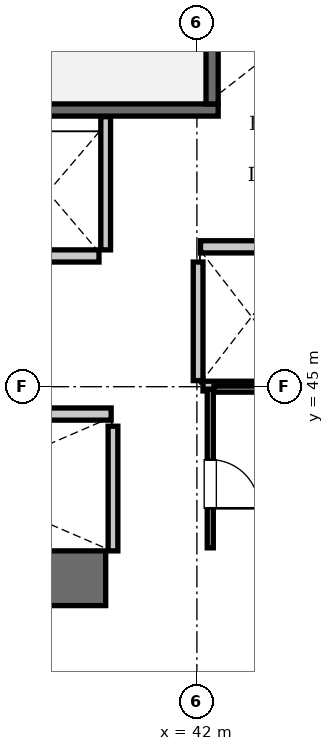
"""IFC4 building model, lengths in metres.
Left out: names, types, materials, properties, quantities, classifications, styles, units other than length and angle.
Written with IfcOpenShell. Run it as: python <this file> out.ifc"""

import sys

from ifc_helpers import new_model, si_unit, direction, frame, frame_2d, origin, place, context, subcontext, project, spatial, rectangle, extrude, element, fill, save


model = new_model("IFC4")
c1 = context("Model", 3, precision=1e-05, world=origin(), true_north=direction((0.0, 1.0)))
c2 = subcontext(c1, "Body", "Model", "MODEL_VIEW")
j1 = project(units=[si_unit("LENGTHUNIT", "METRE"), si_unit("PLANEANGLEUNIT", "RADIAN")], contexts=[c1])
p1 = place(None, origin())
s1 = spatial("IfcSite", under=j1, at=p1, CompositionType="ELEMENT")
p2 = place(p1, origin())
s2 = spatial("IfcBuilding", under=s1, at=p2, CompositionType="ELEMENT")
p3 = place(p2, frame((0.0, 0.0, 34.65)))
s3 = spatial("IfcBuildingStorey", under=s2, at=p3, CompositionType="ELEMENT", Elevation=34.65)
p4 = place(p3, frame((35.1, 41.85, 0.0), z_axis=(0.0, 0.0, 1.0), x_axis=(1.0, 0.0, 0.0)))
e1 = element("IfcWall", 1, at=p4, inside=s3, PredefinedType="SHEAR", context=c2, shape_type="SweptSolid", body=[
    extrude(rectangle(XDim=5.4, YDim=0.9, at=frame_2d((2.7, 0.0))), origin(), (0.0, 0.0, 1.0), 3.85),
])
p5 = place(p3, frame((33.25, 49.55, 0.0), z_axis=(0.0, 0.0, 1.0), x_axis=(1.0, 0.0, 0.0)))
e2 = element("IfcWall", 2, at=p5, inside=s3, PredefinedType="SOLIDWALL", context=c2, shape_type="SweptSolid", body=[
    extrude(rectangle(XDim=9.1, YDim=0.2, at=frame_2d((4.55, 0.0))), origin(), (0.0, 0.0, 1.0), 3.61),
])
p6 = place(p3, frame((42.25, 49.65, 0.0), z_axis=(0.0, 0.0, 1.0), x_axis=(0.0, 1.0, 0.0)))
e3 = element("IfcWall", 3, at=p6, inside=s3, PredefinedType="SOLIDWALL", context=c2, shape_type="SweptSolid", body=[
    extrude(rectangle(XDim=3.45, YDim=0.2, at=frame_2d((1.725, 0.0))), origin(), (0.0, 0.0, 1.0), 3.61),
])
p7 = place(p3, frame((42.06, 47.3, 0.0), z_axis=(0.0, 0.0, 1.0), x_axis=(1.0, 0.0, 0.0)))
e4 = element("IfcWall", 4, at=p7, inside=s3, PredefinedType="SOLIDWALL", context=c2, shape_type="SweptSolid", body=[
    extrude(rectangle(XDim=1.68, YDim=0.2, at=frame_2d((0.84, 0.0))), origin(), (0.0, 0.0, 1.0), 3.61),
])
p8 = place(p3, frame((38.91, 44.55, 0.0), z_axis=(0.0, 0.0, 1.0), x_axis=(1.0, 0.0, 0.0)))
e5 = element("IfcWall", 5, at=p8, inside=s3, PredefinedType="SOLIDWALL", context=c2, shape_type="SweptSolid", body=[
    extrude(rectangle(XDim=1.68, YDim=0.2, at=frame_2d((0.84, 0.0))), origin(), (0.0, 0.0, 1.0), 3.61),
])
p9 = place(p3, frame((38.71, 47.15, 0.0), z_axis=(0.0, 0.0, 1.0), x_axis=(1.0, 0.0, 0.0)))
e6 = element("IfcWall", 6, at=p9, inside=s3, PredefinedType="SOLIDWALL", context=c2, shape_type="SweptSolid", body=[
    extrude(rectangle(XDim=1.68, YDim=0.2, at=frame_2d((0.84, 0.0))), origin(), (0.0, 0.0, 1.0), 3.61),
])
p10 = place(p3, frame((42.02, 45.1, 0.0), z_axis=(0.0, 0.0, 1.0), x_axis=(0.0, 1.0, 0.0)))
e7 = element("IfcWall", 7, at=p10, inside=s3, PredefinedType="SOLIDWALL", context=c2, shape_type="SweptSolid", body=[
    extrude(rectangle(XDim=1.95, YDim=0.16, at=frame_2d((0.975, 0.0))), origin(), (0.0, 0.0, 1.0), 3.61),
])
p11 = place(p3, frame((42.1, 45.01, 0.0), z_axis=(0.0, 0.0, 1.0), x_axis=(1.0, 0.0, 0.0)))
e8 = element("IfcWall", 8, at=p11, inside=s3, PredefinedType="SOLIDWALL", context=c2, shape_type="SweptSolid", body=[
    extrude(rectangle(XDim=3.45, YDim=0.16, at=frame_2d((1.725, 0.0))), origin(), (0.0, 0.0, 1.0), 3.61),
])
p12 = place(p3, frame((40.62, 42.3, 0.0), z_axis=(0.0, 0.0, 1.0), x_axis=(0.0, 1.0, 0.0)))
e9 = element("IfcWall", 9, at=p12, inside=s3, PredefinedType="SOLIDWALL", context=c2, shape_type="SweptSolid", body=[
    extrude(rectangle(XDim=2.05, YDim=0.16, at=frame_2d((1.025, 0.0))), origin(), (0.0, 0.0, 1.0), 3.61),
])
p13 = place(p3, frame((40.5, 47.25, 0.0), z_axis=(0.0, 0.0, 1.0), x_axis=(0.0, 1.0, 0.0)))
e10 = element("IfcWall", 10, at=p13, inside=s3, PredefinedType="SOLIDWALL", context=c2, shape_type="SweptSolid", body=[
    extrude(rectangle(XDim=2.19, YDim=0.16, at=frame_2d((1.095, 0.0))), origin(), (0.0, 0.0, 1.0), 3.61),
])
p14 = place(p3, frame((42.22, 42.35, 0.0), z_axis=(0.0, 0.0, 1.0), x_axis=(0.0, 1.0, 0.0)))
e11 = element("IfcWall", 11, at=p14, inside=s3, PredefinedType="PARTITIONING", context=c2, shape_type="SweptSolid", body=[
    extrude(rectangle(XDim=2.61, YDim=0.1, at=frame_2d((1.305, 0.0))), origin(), (0.0, 0.0, 1.0), 3.61),
])
p15 = place(p14, frame((0.65, 0.0, 0.0)))
e12 = element("IfcOpeningElement", 12, at=p15, cuts=e11, PredefinedType="OPENING", context=c2, shape_type="SweptSolid", body=[
    extrude(rectangle(XDim=0.8, YDim=2.05, at=frame_2d((0.4, 1.025))), frame((0.0, 0.06, 0.0), z_axis=(0.0, -1.0, 0.0), x_axis=(1.0, 0.0, 0.0)), (0.0, 0.0, 1.0), 0.12),
])
p16 = place(p3, frame((42.28, 44.96, 0.0), z_axis=(0.0, 0.0, 1.0), x_axis=(1.0, 0.0, 0.0)))
e13 = element("IfcWall", 13, at=p16, inside=s3, PredefinedType="PARTITIONING", context=c2, shape_type="SweptSolid", body=[
    extrude(rectangle(XDim=1.3, YDim=0.1, at=frame_2d((0.65, 0.0))), origin(), (0.0, 0.0, 1.0), 3.61),
])
p17 = place(p15, frame((0.8, 0.0, 0.0), z_axis=(0.0, 0.0, 1.0), x_axis=(-1.0, 0.0, 0.0)))
e14 = element("IfcDoor", 14, at=p17, inside=s3, OperationType="SINGLE_SWING_RIGHT", PredefinedType="DOOR", context=c2, shape_type="SweptSolid", body=[
    extrude(rectangle(XDim=0.8, YDim=2.05, at=frame_2d((0.4, 1.025))), frame((0.0, 0.025, 0.0), z_axis=(0.0, -1.0, 0.0), x_axis=(1.0, 0.0, 0.0)), (0.0, 0.0, 1.0), 0.05),
])
fill(e12, e14)
save(model, sys.argv[1])
